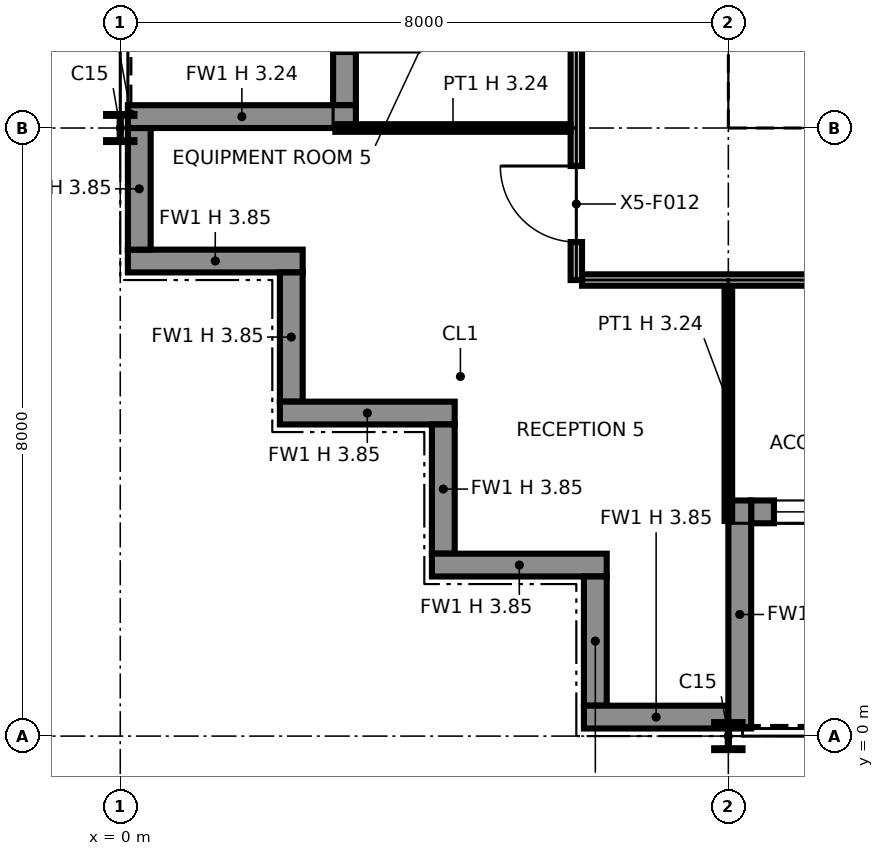
"""IFC4 building model, lengths in metres.
Left out: names, types, materials, properties, quantities, classifications, styles, units other than length and angle.
Written with IfcOpenShell. Run it as: python <this file> out.ifc"""

import sys

from ifc_helpers import new_model, si_unit, direction, frame, frame_2d, origin, origin_2d, place, context, subcontext, project, spatial, polyline, rectangle, i_section, outline, extrude, element, fill, save


model = new_model("IFC4")
c1 = context("Model", 3, precision=1e-05, world=origin(), true_north=direction((0.0, 1.0)))
c2 = subcontext(c1, "Body", "Model", "MODEL_VIEW")
j1 = project(units=[si_unit("LENGTHUNIT", "METRE"), si_unit("PLANEANGLEUNIT", "RADIAN")], contexts=[c1])
p1 = place(None, origin())
s1 = spatial("IfcSite", under=j1, at=p1, CompositionType="ELEMENT")
p2 = place(p1, origin())
s2 = spatial("IfcBuilding", under=s1, at=p2, CompositionType="ELEMENT")
p3 = place(p2, frame((0.0, 0.0, 283.0)))
s3 = spatial("IfcBuildingStorey", under=s2, at=p3, CompositionType="ELEMENT", Elevation=283.0)
for number, where, z_axis, x_axis in (
    (1, (0.0, 8.0, 0.0), (0.0, 0.0, 1.0), (1.0, 0.0, 0.0)),
    (2, (8.0, 0.0, 0.0), (0.0, 0.0, 1.0), (1.0, 0.0, 0.0)),
):
    element("IfcColumn", number, at=place(p3, frame(where, z_axis=z_axis, x_axis=x_axis)), inside=s3, PredefinedType="COLUMN", context=c2, shape_type="SweptSolid", body=[
        extrude(i_section(OverallWidth=0.373, OverallDepth=0.368, WebThickness=0.015, FlangeThickness=0.024, at=origin_2d()), origin(), (0.0, 0.0, 1.0), 3.85),
    ])
p4 = place(p3, frame((8.0, 8.0, 0.0), z_axis=(0.0, 0.0, 1.0), x_axis=(1.0, 0.0, 0.0)))
e3 = element("IfcColumn", 3, at=p4, inside=s3, PredefinedType="COLUMN", context=c2, shape_type="SweptSolid", body=[
    extrude(i_section(OverallWidth=0.257, OverallDepth=0.363, WebThickness=0.013, FlangeThickness=0.022, at=origin_2d()), origin(), (0.0, 0.0, 1.0), 3.85),
])
p5 = place(p3, frame((0.1, 6.25, 0.0), z_axis=(0.0, 0.0, 1.0), x_axis=(1.0, 0.0, 0.0)))
e4 = element("IfcWall", 4, at=p5, inside=s3, PredefinedType="SOLIDWALL", context=c2, shape_type="SweptSolid", body=[
    extrude(rectangle(XDim=2.3, YDim=0.3, at=frame_2d((1.15, 0.0))), origin(), (0.0, 0.0, 1.0), 3.85),
])
p6 = place(p3, frame((2.25, 6.1, 0.0), z_axis=(0.0, 0.0, 1.0), x_axis=(0.0, -1.0, 0.0)))
e5 = element("IfcWall", 5, at=p6, inside=s3, PredefinedType="SOLIDWALL", context=c2, shape_type="SweptSolid", body=[
    extrude(rectangle(XDim=1.7, YDim=0.3, at=frame_2d((0.85, 0.0))), origin(), (0.0, 0.0, 1.0), 3.85),
])
p7 = place(p3, frame((2.1, 4.25, 0.0), z_axis=(0.0, 0.0, 1.0), x_axis=(1.0, 0.0, 0.0)))
e6 = element("IfcWall", 6, at=p7, inside=s3, PredefinedType="SOLIDWALL", context=c2, shape_type="SweptSolid", body=[
    extrude(rectangle(XDim=2.3, YDim=0.3, at=frame_2d((1.15, 0.0))), origin(), (0.0, 0.0, 1.0), 3.85),
])
p8 = place(p3, frame((4.25, 4.1, 0.0), z_axis=(0.0, 0.0, 1.0), x_axis=(0.0, -1.0, 0.0)))
e7 = element("IfcWall", 7, at=p8, inside=s3, PredefinedType="SOLIDWALL", context=c2, shape_type="SweptSolid", body=[
    extrude(rectangle(XDim=1.7, YDim=0.3, at=frame_2d((0.85, 0.0))), origin(), (0.0, 0.0, 1.0), 3.85),
])
p9 = place(p3, frame((4.1, 2.25, 0.0), z_axis=(0.0, 0.0, 1.0), x_axis=(1.0, 0.0, 0.0)))
e8 = element("IfcWall", 8, at=p9, inside=s3, PredefinedType="SOLIDWALL", context=c2, shape_type="SweptSolid", body=[
    extrude(rectangle(XDim=2.3, YDim=0.3, at=frame_2d((1.15, 0.0))), origin(), (0.0, 0.0, 1.0), 3.85),
])
p10 = place(p3, frame((6.25, 2.1, 0.0), z_axis=(0.0, 0.0, 1.0), x_axis=(0.0, -1.0, 0.0)))
e9 = element("IfcWall", 9, at=p10, inside=s3, PredefinedType="SOLIDWALL", context=c2, shape_type="SweptSolid", body=[
    extrude(rectangle(XDim=1.7, YDim=0.3, at=frame_2d((0.85, 0.0))), origin(), (0.0, 0.0, 1.0), 3.85),
])
p11 = place(p3, frame((6.1, 0.25, 0.0), z_axis=(0.0, 0.0, 1.0), x_axis=(1.0, 0.0, 0.0)))
e10 = element("IfcWall", 10, at=p11, inside=s3, PredefinedType="SOLIDWALL", context=c2, shape_type="SweptSolid", body=[
    extrude(rectangle(XDim=1.9, YDim=0.3, at=frame_2d((0.95, 0.0))), origin(), (0.0, 0.0, 1.0), 3.85),
])
p12 = place(p3, frame((8.3, 2.95, 0.0), z_axis=(0.0, 0.0, 1.0), x_axis=(1.0, 0.0, 0.0)))
e11 = element("IfcWall", 11, at=p12, inside=s3, PredefinedType="SOLIDWALL", context=c2, shape_type="SweptSolid", body=[
    extrude(rectangle(XDim=7.4, YDim=0.3, at=frame_2d((3.7, 0.0))), origin(), (0.0, 0.0, 1.0), 3.85),
])
p13 = place(p12, frame((0.3, 0.0, 0.9)))
e12 = element("IfcOpeningElement", 12, at=p13, cuts=e11, PredefinedType="OPENING", context=c2, shape_type="SweptSolid", body=[
    extrude(rectangle(XDim=2.8, YDim=2.2, at=frame_2d((1.4, 1.1))), frame((0.0, 0.16, 0.0), z_axis=(0.0, -1.0, 0.0), x_axis=(1.0, 0.0, 0.0)), (0.0, 0.0, 1.0), 0.32),
])
p14 = place(p12, frame((4.7, 0.0, 0.0)))
e13 = element("IfcOpeningElement", 13, at=p14, cuts=e11, PredefinedType="OPENING", context=c2, shape_type="SweptSolid", body=[
    extrude(rectangle(XDim=2.0, YDim=2.4, at=frame_2d((1.0, 1.2))), frame((0.0, 0.16, 0.0), z_axis=(0.0, -1.0, 0.0), x_axis=(1.0, 0.0, 0.0)), (0.0, 0.0, 1.0), 0.32),
])
p15 = place(p3, frame((8.15, 0.1, 0.0), z_axis=(0.0, 0.0, 1.0), x_axis=(0.0, 1.0, 0.0)))
e14 = element("IfcWall", 14, at=p15, inside=s3, PredefinedType="SOLIDWALL", context=c2, shape_type="SweptSolid", body=[
    extrude(rectangle(XDim=3.0, YDim=0.3, at=frame_2d((1.5, 0.0))), origin(), (0.0, 0.0, 1.0), 3.237),
])
p16 = place(p3, frame((2.95, 15.7, 0.0), z_axis=(0.0, 0.0, 1.0), x_axis=(0.0, -1.0, 0.0)))
e15 = element("IfcWall", 15, at=p16, inside=s3, PredefinedType="SOLIDWALL", context=c2, shape_type="SweptSolid", body=[
    extrude(rectangle(XDim=7.4, YDim=0.3, at=frame_2d((3.7, 0.0))), origin(), (0.0, 0.0, 1.0), 3.85),
])
p17 = place(p16, frame((0.3, 0.0, 0.9)))
e16 = element("IfcOpeningElement", 16, at=p17, cuts=e15, PredefinedType="OPENING", context=c2, shape_type="SweptSolid", body=[
    extrude(rectangle(XDim=2.8, YDim=2.2, at=frame_2d((1.4, 1.1))), frame((0.0, 0.16, 0.0), z_axis=(0.0, -1.0, 0.0), x_axis=(1.0, 0.0, 0.0)), (0.0, 0.0, 1.0), 0.32),
])
p18 = place(p16, frame((4.7, 0.0, 0.0)))
e17 = element("IfcOpeningElement", 17, at=p18, cuts=e15, PredefinedType="OPENING", context=c2, shape_type="SweptSolid", body=[
    extrude(rectangle(XDim=2.0, YDim=2.4, at=frame_2d((1.0, 1.2))), frame((0.0, 0.16, 0.0), z_axis=(0.0, -1.0, 0.0), x_axis=(1.0, 0.0, 0.0)), (0.0, 0.0, 1.0), 0.32),
])
p19 = place(p3, frame((0.1, 8.15, 0.0), z_axis=(0.0, 0.0, 1.0), x_axis=(1.0, 0.0, 0.0)))
e18 = element("IfcWall", 18, at=p19, inside=s3, PredefinedType="SOLIDWALL", context=c2, shape_type="SweptSolid", body=[
    extrude(rectangle(XDim=3.0, YDim=0.3, at=frame_2d((1.5, 0.0))), origin(), (0.0, 0.0, 1.0), 3.237),
])
p20 = place(p3, frame((0.25, 8.0, 0.0), z_axis=(0.0, 0.0, 1.0), x_axis=(0.0, -1.0, 0.0)))
e19 = element("IfcWall", 19, at=p20, inside=s3, PredefinedType="SOLIDWALL", context=c2, shape_type="SweptSolid", body=[
    extrude(rectangle(XDim=1.6, YDim=0.3, at=frame_2d((0.8, 0.0))), origin(), (0.0, 0.0, 1.0), 3.85),
])
p21 = place(p3, frame((8.65, 8.75, 0.0), z_axis=(0.0, 0.0, 1.0), x_axis=(1.0, 0.0, 0.0)))
e20 = element("IfcWall", 20, at=p21, inside=s3, PredefinedType="PARTITIONING", context=c2, shape_type="SweptSolid", body=[
    extrude(outline(polyline([(0.0, 0.0), (14.7, 0.0), (14.7, 3.85), (7.438, 3.85), (7.437, 3.318), (7.263, 3.318), (7.262, 3.85), (0.0, 3.85), (0.0, 0.0)])), frame((0.0, 0.1, 0.0), z_axis=(0.0, -1.0, 0.0), x_axis=(1.0, 0.0, 0.0)), (0.0, 0.0, 1.0), 0.2),
])
p22 = place(p21, frame((1.3, 0.0, 0.0)))
e21 = element("IfcOpeningElement", 21, at=p22, cuts=e20, PredefinedType="OPENING", context=c2, shape_type="SweptSolid", body=[
    extrude(rectangle(XDim=1.4, YDim=2.1, at=frame_2d((0.7, 1.05))), frame((0.0, 0.11, 0.0), z_axis=(0.0, -1.0, 0.0), x_axis=(1.0, 0.0, 0.0)), (0.0, 0.0, 1.0), 0.22),
])
p23 = place(p21, frame((4.6, 0.0, 0.0)))
e22 = element("IfcOpeningElement", 22, at=p23, cuts=e20, PredefinedType="OPENING", context=c2, shape_type="SweptSolid", body=[
    extrude(rectangle(XDim=1.4, YDim=2.1, at=frame_2d((0.7, 1.05))), frame((0.0, 0.11, 0.0), z_axis=(0.0, -1.0, 0.0), x_axis=(1.0, 0.0, 0.0)), (0.0, 0.0, 1.0), 0.22),
])
p24 = place(p21, frame((10.4, 0.0, 0.0)))
e23 = element("IfcOpeningElement", 23, at=p24, cuts=e20, PredefinedType="OPENING", context=c2, shape_type="SweptSolid", body=[
    extrude(rectangle(XDim=1.2, YDim=2.1, at=frame_2d((0.6, 1.05))), frame((0.0, 0.11, 0.0), z_axis=(0.0, -1.0, 0.0), x_axis=(1.0, 0.0, 0.0)), (0.0, 0.0, 1.0), 0.22),
])
p25 = place(p3, frame((8.75, 8.85, 0.0), z_axis=(0.0, 0.0, 1.0), x_axis=(0.0, 1.0, 0.0)))
e24 = element("IfcWall", 24, at=p25, inside=s3, PredefinedType="PARTITIONING", context=c2, shape_type="SweptSolid", body=[
    extrude(outline(polyline([(0.0, 0.0), (14.3, 0.0), (14.3, 3.85), (10.225, 3.85), (10.224, 3.44), (10.076, 3.44), (10.075, 3.85), (7.238, 3.85), (7.237, 3.318), (7.063, 3.318), (7.062, 3.85), (0.0, 3.85), (0.0, 0.0)])), frame((0.0, 0.1, 0.0), z_axis=(0.0, -1.0, 0.0), x_axis=(1.0, 0.0, 0.0)), (0.0, 0.0, 1.0), 0.2),
])
p26 = place(p25, frame((8.3, 0.0, 0.0)))
e25 = element("IfcOpeningElement", 25, at=p26, cuts=e24, PredefinedType="OPENING", context=c2, shape_type="SweptSolid", body=[
    extrude(rectangle(XDim=1.8, YDim=2.1, at=frame_2d((0.9, 1.05))), frame((0.0, 0.11, 0.0), z_axis=(0.0, -1.0, 0.0), x_axis=(1.0, 0.0, 0.0)), (0.0, 0.0, 1.0), 0.22),
])
p27 = place(p3, frame((8.0, 2.83, 0.0), z_axis=(0.0, 0.0, 1.0), x_axis=(0.0, 1.0, 0.0)))
e26 = element("IfcWall", 26, at=p27, inside=s3, PredefinedType="PARTITIONING", context=c2, shape_type="SweptSolid", body=[
    extrude(rectangle(XDim=3.095, YDim=0.1, at=frame_2d((1.547, 0.0))), origin(), (0.0, 0.0, 1.0), 3.238),
])
p28 = place(p3, frame((6.075, 6.0, 0.0), z_axis=(0.0, 0.0, 1.0), x_axis=(1.0, 0.0, 0.0)))
e27 = element("IfcWall", 27, at=p28, inside=s3, PredefinedType="PARTITIONING", context=c2, shape_type="SweptSolid", body=[
    extrude(rectangle(XDim=35.85, YDim=0.15, at=frame_2d((17.925, 0.0))), origin(), (0.0, 0.0, 1.0), 3.85),
])
p29 = place(p28, frame((12.425, 0.0, 0.0), z_axis=(0.0, 0.0, 1.0), x_axis=(-1.0, 0.0, 0.0)))
e28 = element("IfcOpeningElement", 28, at=p29, cuts=e27, PredefinedType="OPENING", context=c2, shape_type="SweptSolid", body=[
    extrude(rectangle(XDim=1.0, YDim=2.1, at=frame_2d((0.5, 1.05))), frame((0.0, 0.085, 0.0), z_axis=(0.0, -1.0, 0.0), x_axis=(1.0, 0.0, 0.0)), (0.0, 0.0, 1.0), 0.17),
])
p30 = place(p28, frame((16.425, 0.0, 0.0), z_axis=(0.0, 0.0, 1.0), x_axis=(-1.0, 0.0, 0.0)))
e29 = element("IfcOpeningElement", 29, at=p30, cuts=e27, PredefinedType="OPENING", context=c2, shape_type="SweptSolid", body=[
    extrude(rectangle(XDim=1.0, YDim=2.1, at=frame_2d((0.5, 1.05))), frame((0.0, 0.085, 0.0), z_axis=(0.0, -1.0, 0.0), x_axis=(1.0, 0.0, 0.0)), (0.0, 0.0, 1.0), 0.17),
])
p31 = place(p28, frame((29.425, 0.0, 0.0)))
e30 = element("IfcOpeningElement", 30, at=p31, cuts=e27, PredefinedType="OPENING", context=c2, shape_type="SweptSolid", body=[
    extrude(rectangle(XDim=1.0, YDim=2.1, at=frame_2d((0.5, 1.05))), frame((0.0, 0.085, 0.0), z_axis=(0.0, -1.0, 0.0), x_axis=(1.0, 0.0, 0.0)), (0.0, 0.0, 1.0), 0.17),
])
p32 = place(p28, frame((34.425, 0.0, 0.0)))
e31 = element("IfcOpeningElement", 31, at=p32, cuts=e27, PredefinedType="OPENING", context=c2, shape_type="SweptSolid", body=[
    extrude(rectangle(XDim=1.0, YDim=2.1, at=frame_2d((0.5, 1.05))), frame((0.0, 0.085, 0.0), z_axis=(0.0, -1.0, 0.0), x_axis=(1.0, 0.0, 0.0)), (0.0, 0.0, 1.0), 0.17),
])
p33 = place(p28, frame((4.425, 0.0, 0.0), z_axis=(0.0, 0.0, 1.0), x_axis=(-1.0, 0.0, 0.0)))
e32 = element("IfcOpeningElement", 32, at=p33, cuts=e27, PredefinedType="OPENING", context=c2, shape_type="SweptSolid", body=[
    extrude(rectangle(XDim=1.0, YDim=2.1, at=frame_2d((0.5, 1.05))), frame((0.0, 0.085, 0.0), z_axis=(0.0, -1.0, 0.0), x_axis=(1.0, 0.0, 0.0)), (0.0, 0.0, 1.0), 0.17),
])
p34 = place(p28, frame((8.425, 0.0, 0.0), z_axis=(0.0, 0.0, 1.0), x_axis=(-1.0, 0.0, 0.0)))
e33 = element("IfcOpeningElement", 33, at=p34, cuts=e27, PredefinedType="OPENING", context=c2, shape_type="SweptSolid", body=[
    extrude(rectangle(XDim=1.0, YDim=2.1, at=frame_2d((0.5, 1.05))), frame((0.0, 0.085, 0.0), z_axis=(0.0, -1.0, 0.0), x_axis=(1.0, 0.0, 0.0)), (0.0, 0.0, 1.0), 0.17),
])
p35 = place(p28, frame((19.425, 0.0, 0.0), z_axis=(0.0, 0.0, 1.0), x_axis=(-1.0, 0.0, 0.0)))
e34 = element("IfcOpeningElement", 34, at=p35, cuts=e27, PredefinedType="OPENING", context=c2, shape_type="SweptSolid", body=[
    extrude(rectangle(XDim=1.0, YDim=2.1, at=frame_2d((0.5, 1.05))), frame((0.0, 0.085, 0.0), z_axis=(0.0, -1.0, 0.0), x_axis=(1.0, 0.0, 0.0)), (0.0, 0.0, 1.0), 0.17),
])
p36 = place(p28, frame((24.425, 0.0, 0.0), z_axis=(0.0, 0.0, 1.0), x_axis=(-1.0, 0.0, 0.0)))
e35 = element("IfcOpeningElement", 35, at=p36, cuts=e27, PredefinedType="OPENING", context=c2, shape_type="SweptSolid", body=[
    extrude(rectangle(XDim=1.0, YDim=2.1, at=frame_2d((0.5, 1.05))), frame((0.0, 0.085, 0.0), z_axis=(0.0, -1.0, 0.0), x_axis=(1.0, 0.0, 0.0)), (0.0, 0.0, 1.0), 0.17),
])
p37 = place(p3, frame((6.0, 6.0, 0.0), z_axis=(0.0, 0.0, 1.0), x_axis=(0.0, 1.0, 0.0)))
e36 = element("IfcWall", 36, at=p37, inside=s3, PredefinedType="PARTITIONING", context=c2, shape_type="SweptSolid", body=[
    extrude(outline(polyline([(0.0, 0.0), (13.375, 0.0), (13.375, 3.85), (10.3, 3.85), (10.298, 3.238), (9.702, 3.238), (9.7, 3.85), (6.3, 3.85), (6.298, 3.238), (5.702, 3.238), (5.7, 3.85), (2.3, 3.85), (2.298, 3.238), (1.702, 3.238), (1.7, 3.85), (0.0, 3.85), (0.0, 0.0)])), frame((0.0, 0.075, 0.0), z_axis=(0.0, -1.0, 0.0), x_axis=(1.0, 0.0, 0.0)), (0.0, 0.0, 1.0), 0.15),
])
p38 = place(p37, frame((0.5, 0.0, 0.0)))
e37 = element("IfcOpeningElement", 37, at=p38, cuts=e36, PredefinedType="OPENING", context=c2, shape_type="SweptSolid", body=[
    extrude(rectangle(XDim=1.0, YDim=2.1, at=frame_2d((0.5, 1.05))), frame((0.0, 0.085, 0.0), z_axis=(0.0, -1.0, 0.0), x_axis=(1.0, 0.0, 0.0)), (0.0, 0.0, 1.0), 0.17),
])
p39 = place(p37, frame((3.5, 0.0, 0.0)))
e38 = element("IfcOpeningElement", 38, at=p39, cuts=e36, PredefinedType="OPENING", context=c2, shape_type="SweptSolid", body=[
    extrude(rectangle(XDim=1.0, YDim=2.1, at=frame_2d((0.5, 1.05))), frame((0.0, 0.085, 0.0), z_axis=(0.0, -1.0, 0.0), x_axis=(1.0, 0.0, 0.0)), (0.0, 0.0, 1.0), 0.17),
])
p40 = place(p37, frame((7.5, 0.0, 0.0)))
e39 = element("IfcOpeningElement", 39, at=p40, cuts=e36, PredefinedType="OPENING", context=c2, shape_type="SweptSolid", body=[
    extrude(rectangle(XDim=1.0, YDim=2.1, at=frame_2d((0.5, 1.05))), frame((0.0, 0.085, 0.0), z_axis=(0.0, -1.0, 0.0), x_axis=(1.0, 0.0, 0.0)), (0.0, 0.0, 1.0), 0.17),
])
p41 = place(p37, frame((12.225, 0.0, 0.0), z_axis=(0.0, 0.0, 1.0), x_axis=(-1.0, 0.0, 0.0)))
e40 = element("IfcOpeningElement", 40, at=p41, cuts=e36, PredefinedType="OPENING", context=c2, shape_type="SweptSolid", body=[
    extrude(rectangle(XDim=1.0, YDim=2.1, at=frame_2d((0.5, 1.05))), frame((0.0, 0.085, 0.0), z_axis=(0.0, -1.0, 0.0), x_axis=(1.0, 0.0, 0.0)), (0.0, 0.0, 1.0), 0.17),
])
p42 = place(p3, frame((2.83, 8.0, 0.0), z_axis=(0.0, 0.0, 1.0), x_axis=(1.0, 0.0, 0.0)))
e41 = element("IfcWall", 41, at=p42, inside=s3, PredefinedType="PARTITIONING", context=c2, shape_type="SweptSolid", body=[
    extrude(rectangle(XDim=3.095, YDim=0.1, at=frame_2d((1.547, 0.0))), origin(), (0.0, 0.0, 1.0), 3.238),
])
p43 = place(p13, origin())
e42 = element("IfcWindow", 42, at=p43, inside=s3, PartitioningType="SINGLE_PANEL", PredefinedType="WINDOW", context=c2, shape_type="SweptSolid", body=[
    extrude(rectangle(XDim=2.8, YDim=2.2, at=frame_2d((1.4, 1.1))), frame((0.0, 0.03, 0.0), z_axis=(0.0, -1.0, 0.0), x_axis=(1.0, 0.0, 0.0)), (0.0, 0.0, 1.0), 0.06),
])
fill(e12, e42)
p44 = place(p38, origin())
e43 = element("IfcDoor", 43, at=p44, inside=s3, OperationType="SINGLE_SWING_RIGHT", PredefinedType="DOOR", context=c2, shape_type="SweptSolid", body=[
    extrude(rectangle(XDim=1.0, YDim=2.1, at=frame_2d((0.5, 1.05))), frame((0.0, 0.025, 0.0), z_axis=(0.0, -1.0, 0.0), x_axis=(1.0, 0.0, 0.0)), (0.0, 0.0, 1.0), 0.05),
])
fill(e37, e43)
save(model, sys.argv[1])
